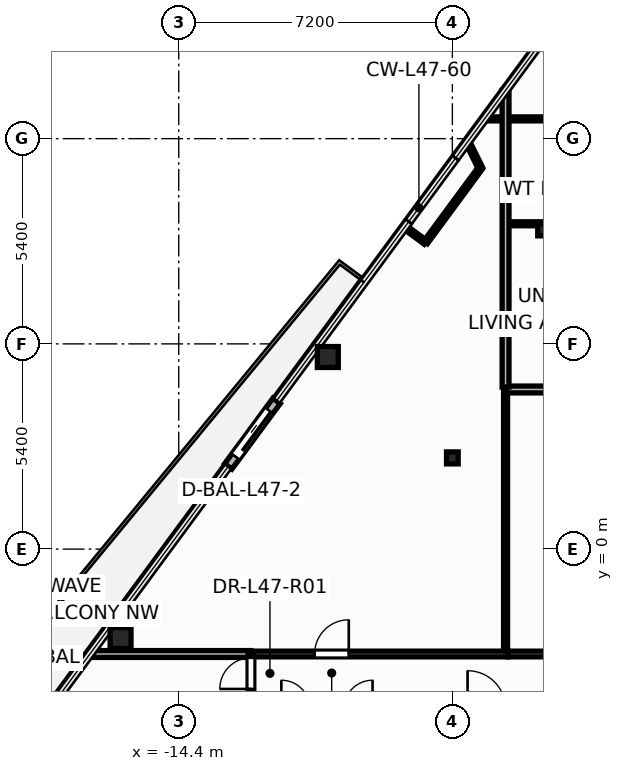
"""IFC4 building model, lengths in metres.
Left out: names, types, materials, properties, quantities, classifications, styles, units other than length and angle.
Written with IfcOpenShell. Run it as: python <this file> out.ifc"""

import sys

from ifc_helpers import new_model, si_unit, direction, frame, frame_2d, origin, origin_2d, place, context, subcontext, project, spatial, rectangle, hollow_circle, i_section, extrude, element, fill, save


model = new_model("IFC4")
c1 = context("Model", 3, precision=1e-05, world=origin(), true_north=direction((0.0, 1.0)))
c2 = subcontext(c1, "Body", "Model", "MODEL_VIEW")
j1 = project(units=[si_unit("LENGTHUNIT", "METRE"), si_unit("PLANEANGLEUNIT", "RADIAN")], contexts=[c1])
p1 = place(None, origin())
s1 = spatial("IfcSite", under=j1, at=p1, CompositionType="ELEMENT")
p2 = place(p1, origin())
s2 = spatial("IfcBuilding", under=s1, at=p2, CompositionType="ELEMENT")
p3 = place(p2, frame((0.0, 0.0, 182.1)))
s3 = spatial("IfcBuildingStorey", under=s2, at=p3, CompositionType="ELEMENT", Elevation=182.1)
for number, where, z_axis, x_axis in (
    (1, (-10.477, 5.055, 0.0), (0.0, 0.0, 1.0), (1.0, 0.0, 0.0)),
    (2, (-15.931, -2.341, 0.0), (0.0, 0.0, 1.0), (1.0, 0.0, 0.0)),
):
    element("IfcColumn", number, at=place(p3, frame(where, z_axis=z_axis, x_axis=x_axis)), inside=s3, PredefinedType="COLUMN", context=c2, shape_type="SweptSolid", body=[
        extrude(hollow_circle(Radius=0.275, WallThickness=0.024, at=origin_2d()), origin(), (0.0, 0.0, 1.0), 3.6),
    ])
for number, where, z_axis, x_axis in (
    (3, (-7.2, 2.4, 0.0), (0.0, 0.0, 1.0), (1.0, 0.0, 0.0)),
    (4, (-4.8, 8.4, 0.0), (0.0, 0.0, 1.0), (1.0, 0.0, 0.0)),
):
    element("IfcColumn", number, at=place(p3, frame(where, z_axis=z_axis, x_axis=x_axis)), inside=s3, PredefinedType="COLUMN", context=c2, shape_type="SweptSolid", body=[
        extrude(i_section(OverallWidth=0.307, OverallDepth=0.314, WebThickness=0.012, FlangeThickness=0.019, at=origin_2d()), origin(), (0.0, 0.0, 1.0), 3.6),
    ])
p4 = place(p3, frame((-11.826, 3.899, -0.015), z_axis=(0.0, 0.0, 1.0), x_axis=(-0.593537527179, -0.804806314482, 0.0)))
e5 = element("IfcWall", 5, at=p4, inside=s3, PredefinedType="STANDARD", context=c2, shape_type="SweptSolid", body=[
    extrude(rectangle(XDim=2.14, YDim=0.24, at=frame_2d((1.07, 0.0))), origin(), (0.0, 0.0, 1.0), 2.807),
])
p5 = place(p4, frame((0.32, 0.0, 0.015)))
e6 = element("IfcOpeningElement", 6, at=p5, cuts=e5, PredefinedType="OPENING", context=c2, shape_type="SweptSolid", body=[
    extrude(rectangle(XDim=1.506, YDim=2.204, at=frame_2d((0.75, 1.102))), frame((0.0, 0.13, 0.0), z_axis=(0.0, -1.0, 0.0), x_axis=(1.0, 0.0, 0.0)), (0.0, 0.0, 1.0), 0.26),
])
p6 = place(p3, frame((-5.8, 8.56, 0.0), z_axis=(0.0, 0.0, 1.0), x_axis=(1.0, 0.0, 0.0)))
e7 = element("IfcWall", 7, at=p6, inside=s3, PredefinedType="PARTITIONING", context=c2, shape_type="SweptSolid", body=[
    extrude(rectangle(XDim=10.8, YDim=0.105, at=frame_2d((5.4, 0.0))), origin(), (0.0, 0.0, 1.0), 2.325),
])
p7 = place(p6, frame((7.768, 0.0, 0.0)))
e8 = element("IfcOpeningElement", 8, at=p7, cuts=e7, PredefinedType="OPENING", context=c2, shape_type="SweptSolid", body=[
    extrude(rectangle(XDim=0.886, YDim=2.104, at=frame_2d((0.44, 1.052))), frame((0.0, 0.062, 0.0), z_axis=(0.0, -1.0, 0.0), x_axis=(1.0, 0.0, 0.0)), (0.0, 0.0, 1.0), 0.125),
])
p8 = place(p3, frame((-6.354, 11.32, 0.0), z_axis=(0.0, 0.0, 1.0), x_axis=(1.0, 0.0, 0.0)))
e9 = element("IfcWall", 9, at=p8, inside=s3, PredefinedType="PARTITIONING", context=c2, shape_type="SweptSolid", body=[
    extrude(rectangle(XDim=7.314, YDim=0.105, at=frame_2d((3.657, 0.0))), origin(), (0.0, 0.0, 1.0), 2.325),
])
p9 = place(p8, frame((3.256, 0.0, 0.0)))
e10 = element("IfcOpeningElement", 10, at=p9, cuts=e9, PredefinedType="OPENING", context=c2, shape_type="SweptSolid", body=[
    extrude(rectangle(XDim=0.886, YDim=2.104, at=frame_2d((0.44, 1.052))), frame((0.0, 0.062, 0.0), z_axis=(0.0, -1.0, 0.0), x_axis=(1.0, 0.0, 0.0)), (0.0, 0.0, 1.0), 0.125),
])
p10 = place(p3, frame((-5.8, -2.76, 0.0), z_axis=(0.0, 0.0, 1.0), x_axis=(0.0, 1.0, 0.0)))
e11 = element("IfcWall", 11, at=p10, inside=s3, PredefinedType="PARTITIONING", context=c2, shape_type="SweptSolid", body=[
    extrude(rectangle(XDim=7.02, YDim=0.105, at=frame_2d((3.51, 0.0))), origin(), (0.0, 0.0, 1.0), 2.325),
])
p11 = place(p3, frame((-12.5, -2.76, 0.0), z_axis=(0.0, 0.0, 1.0), x_axis=(1.0, 0.0, 0.0)))
e12 = element("IfcWall", 12, at=p11, inside=s3, PredefinedType="PARTITIONING", context=c2, shape_type="SweptSolid", body=[
    extrude(rectangle(XDim=6.76, YDim=0.15, at=frame_2d((3.38, 0.0))), origin(), (0.0, 0.0, 1.0), 2.325),
])
p12 = place(p11, frame((1.675, 0.0, 0.0)))
e13 = element("IfcOpeningElement", 13, at=p12, cuts=e12, PredefinedType="OPENING", context=c2, shape_type="SweptSolid", body=[
    extrude(rectangle(XDim=0.906, YDim=2.104, at=frame_2d((0.45, 1.052))), frame((0.0, 0.085, 0.0), z_axis=(0.0, -1.0, 0.0), x_axis=(1.0, 0.0, 0.0)), (0.0, 0.0, 1.0), 0.17),
])
p13 = place(p3, frame((-5.738, -2.76, 0.0), z_axis=(0.0, 0.0, 1.0), x_axis=(1.0, 0.0, 0.0)))
e14 = element("IfcWall", 14, at=p13, inside=s3, PredefinedType="PARTITIONING", context=c2, shape_type="SweptSolid", body=[
    extrude(rectangle(XDim=6.378, YDim=0.15, at=frame_2d((3.189, 0.0))), origin(), (0.0, 0.0, 1.0), 2.325),
])
p14 = place(p3, frame((-5.8, 4.2, 0.0), z_axis=(0.0, 0.0, 1.0), x_axis=(1.0, 0.0, 0.0)))
e15 = element("IfcWall", 15, at=p14, inside=s3, PredefinedType="PARTITIONING", context=c2, shape_type="SweptSolid", body=[
    extrude(rectangle(XDim=6.44, YDim=0.18, at=frame_2d((3.22, 0.0))), origin(), (0.0, 0.0, 1.0), 2.325),
])
p15 = place(p3, frame((-5.8, 4.262, 0.0), z_axis=(0.0, 0.0, 1.0), x_axis=(0.0, 1.0, 0.0)))
e16 = element("IfcWall", 16, at=p15, inside=s3, PredefinedType="PARTITIONING", context=c2, shape_type="SweptSolid", body=[
    extrude(rectangle(XDim=7.809, YDim=0.18, at=frame_2d((3.905, 0.0))), origin(), (0.0, 0.0, 1.0), 2.325),
])
p16 = place(p3, frame((-16.737, -2.76, 0.0), z_axis=(0.0, 0.0, 1.0), x_axis=(1.0, 0.0, 0.0)))
e17 = element("IfcWall", 17, at=p16, inside=s3, PredefinedType="PARTITIONING", context=c2, shape_type="SweptSolid", body=[
    extrude(rectangle(XDim=4.237, YDim=0.18, at=frame_2d((2.118, 0.0))), origin(), (0.0, 0.0, 1.0), 2.325),
])
p17 = place(p3, frame((-6.463, 10.027, 0.0), z_axis=(0.0, 0.0, 1.0), x_axis=(-0.593469747426, -0.804856297043, 0.0)))
e18 = element("IfcWall", 18, at=p17, inside=s3, PredefinedType="PARTITIONING", context=c2, shape_type="SweptSolid", body=[
    extrude(rectangle(XDim=2.43, YDim=0.12, at=frame_2d((1.215, 0.0))), origin(), (0.0, 0.0, 1.0), 3.35),
])
p18 = place(p3, frame((-12.5, -4.24, 0.0), z_axis=(0.0, 0.0, 1.0), x_axis=(0.0, 1.0, 0.0)))
e19 = element("IfcWall", 19, at=p18, inside=s3, PredefinedType="PARTITIONING", context=c2, shape_type="SweptSolid", body=[
    extrude(rectangle(XDim=1.48, YDim=0.15, at=frame_2d((0.74, 0.0))), origin(), (0.0, 0.0, 1.0), 2.325),
])
p19 = place(p18, frame((0.56, 0.0, 0.0)))
e20 = element("IfcOpeningElement", 20, at=p19, cuts=e19, PredefinedType="OPENING", context=c2, shape_type="SweptSolid", body=[
    extrude(rectangle(XDim=0.826, YDim=2.104, at=frame_2d((0.41, 1.052))), frame((0.0, 0.085, 0.0), z_axis=(0.0, -1.0, 0.0), x_axis=(1.0, 0.0, 0.0)), (0.0, 0.0, 1.0), 0.17),
])
p20 = place(p3, frame((-6.797, 10.703, 0.0), z_axis=(0.0, 0.0, 1.0), x_axis=(0.442545737198, -0.896745934191, 0.0)))
e21 = element("IfcWall", 21, at=p20, inside=s3, PredefinedType="PARTITIONING", context=c2, shape_type="SweptSolid", body=[
    extrude(rectangle(XDim=0.754, YDim=0.12, at=frame_2d((0.377, 0.0))), origin(), (0.0, 0.0, 1.0), 2.792),
])
p21 = place(p3, frame((-7.905, 8.071, 0.0), z_axis=(0.0, 0.0, 1.0), x_axis=(-0.804698441933, 0.59368376898, 0.0)))
e22 = element("IfcWall", 22, at=p21, inside=s3, PredefinedType="PARTITIONING", context=c2, shape_type="SweptSolid", body=[
    extrude(rectangle(XDim=0.67, YDim=0.12, at=frame_2d((0.335, 0.0))), origin(), (0.0, 0.0, 1.0), 2.792),
])
p22 = place(p5, origin())
e23 = element("IfcDoor", 23, at=p22, inside=s3, OperationType="SLIDING_TO_RIGHT", PredefinedType="DOOR", context=c2, shape_type="SweptSolid", body=[
    extrude(rectangle(XDim=1.5, YDim=2.2, at=frame_2d((0.75, 1.1))), frame((0.0, 0.025, 0.0), z_axis=(0.0, -1.0, 0.0), x_axis=(1.0, 0.0, 0.0)), (0.0, 0.0, 1.0), 0.05),
])
fill(e6, e23)
p23 = place(p19, origin())
e24 = element("IfcDoor", 24, at=p23, inside=s3, OperationType="SINGLE_SWING_LEFT", PredefinedType="DOOR", context=c2, shape_type="SweptSolid", body=[
    extrude(rectangle(XDim=0.82, YDim=2.1, at=frame_2d((0.41, 1.05))), frame((0.0, 0.025, 0.0), z_axis=(0.0, -1.0, 0.0), x_axis=(1.0, 0.0, 0.0)), (0.0, 0.0, 1.0), 0.05),
])
fill(e20, e24)
p24 = place(p12, origin())
e25 = element("IfcDoor", 25, at=p24, inside=s3, OperationType="SINGLE_SWING_RIGHT", PredefinedType="DOOR", context=c2, shape_type="SweptSolid", body=[
    extrude(rectangle(XDim=0.9, YDim=2.1, at=frame_2d((0.45, 1.05))), frame((0.0, 0.025, 0.0), z_axis=(0.0, -1.0, 0.0), x_axis=(1.0, 0.0, 0.0)), (0.0, 0.0, 1.0), 0.05),
])
fill(e13, e25)
save(model, sys.argv[1])
